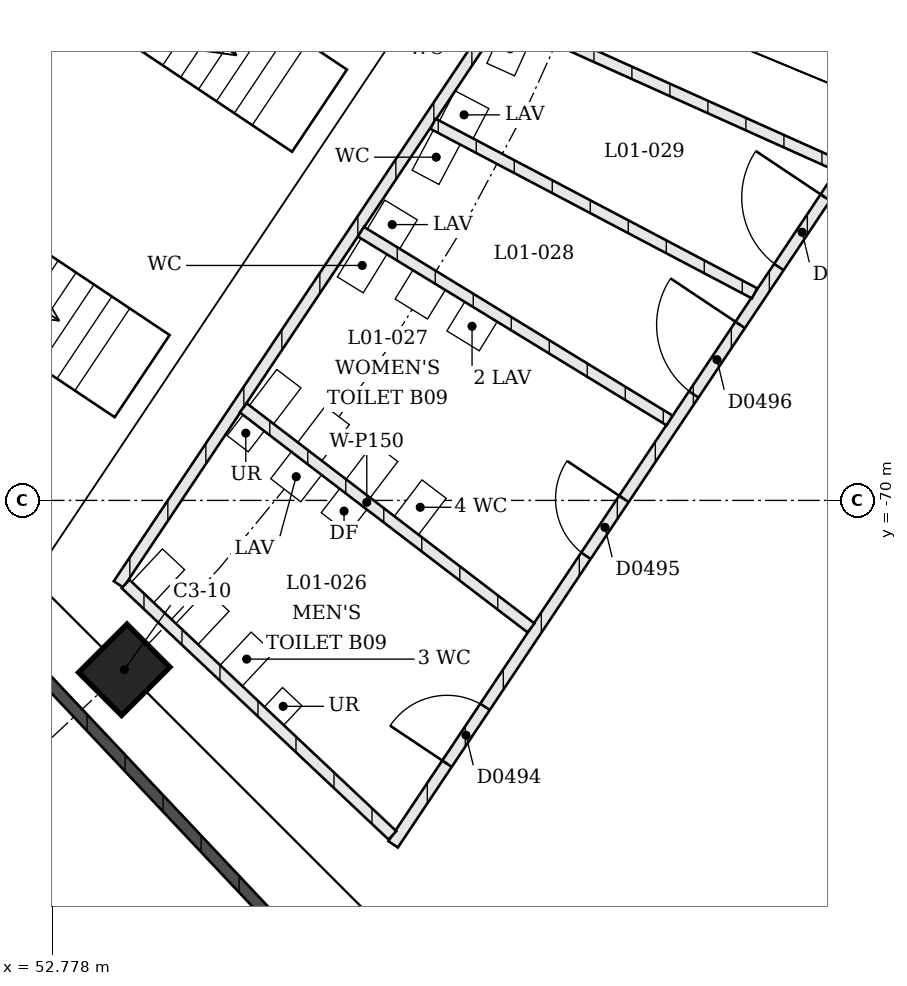
"""IFC4 building model, lengths in metres.
Left out: names, types, materials, properties, quantities, classifications, styles, units other than length and angle.
Written with IfcOpenShell. Run it as: python <this file> out.ifc"""

import sys

from ifc_helpers import new_model, si_unit, direction, frame, frame_2d, origin, origin_2d, place, context, subcontext, project, spatial, rectangle, extrude, element, fill, save


model = new_model("IFC4")
c1 = context("Model", 3, precision=1e-05, world=origin(), true_north=direction((0.0, 1.0)))
c2 = subcontext(c1, "Body", "Model", "MODEL_VIEW")
j1 = project(units=[si_unit("LENGTHUNIT", "METRE"), si_unit("PLANEANGLEUNIT", "RADIAN")], contexts=[c1])
p1 = place(None, origin())
s1 = spatial("IfcSite", under=j1, at=p1, CompositionType="ELEMENT")
p2 = place(p1, origin())
s2 = spatial("IfcBuilding", under=s1, at=p2, CompositionType="ELEMENT")
p3 = place(p2, frame((0.0, 0.0, 4.5)))
s3 = spatial("IfcBuildingStorey", under=s2, at=p3, CompositionType="ELEMENT", Elevation=4.5)
p4 = place(p3, frame((53.728, -72.228, 0.0), z_axis=(0.0, 0.0, 1.0), x_axis=(0.707106781187, 0.707106781187, 0.0)))
e1 = element("IfcColumn", 1, at=p4, inside=s3, PredefinedType="COLUMN", context=c2, shape_type="SweptSolid", body=[
    extrude(rectangle(XDim=0.9, YDim=0.8, at=origin_2d()), origin(), (0.0, 0.0, 1.0), 4.5),
])
p5 = place(p3, frame((59.304, -62.408, 0.0), z_axis=(0.0, 0.0, 1.0), x_axis=(0.931152553876, -0.364629841634, 0.0)))
e2 = element("IfcWall", 2, at=p5, inside=s3, PredefinedType="SOLIDWALL", context=c2, shape_type="SweptSolid", body=[
    extrude(rectangle(XDim=4.832, YDim=0.15, at=frame_2d((2.416, 0.0))), origin(), (0.0, 0.0, 1.0), 3.0),
])
p6 = place(p3, frame((53.653, -71.105, 0.0), z_axis=(0.0, 0.0, 1.0), x_axis=(0.555566497886, 0.831472108027, 0.0)))
e3 = element("IfcWall", 3, at=p6, inside=s3, PredefinedType="PARTITIONING", context=c2, shape_type="SweptSolid", body=[
    extrude(rectangle(XDim=9.102, YDim=0.15, at=frame_2d((4.551, 0.0))), origin(), (0.0, 0.0, 1.0), 3.0),
])
p7 = place(p3, frame((57.266, -74.525, 0.0), z_axis=(0.0, 0.0, 1.0), x_axis=(0.555562662276, 0.831474670862, 0.0)))
e4 = element("IfcWall", 4, at=p7, inside=s3, PredefinedType="PARTITIONING", context=c2, shape_type="SweptSolid", body=[
    extrude(rectangle(XDim=10.775, YDim=0.15, at=frame_2d((5.387, 0.0))), origin(), (0.0, 0.0, 1.0), 3.0),
])
p8 = place(p7, frame((1.276, 0.0, 0.0)))
e5 = element("IfcOpeningElement", 5, at=p8, cuts=e4, PredefinedType="OPENING", context=c2, shape_type="SweptSolid", body=[
    extrude(rectangle(XDim=0.9, YDim=2.1, at=frame_2d((0.45, 1.05))), frame((0.0, 0.075, 0.0), z_axis=(0.0, -1.0, 0.0), x_axis=(1.0, 0.0, 0.0)), (0.0, 0.0, 1.0), 0.15),
])
p9 = place(p7, frame((4.566, 0.0, 0.0)))
e6 = element("IfcOpeningElement", 6, at=p9, cuts=e4, PredefinedType="OPENING", context=c2, shape_type="SweptSolid", body=[
    extrude(rectangle(XDim=0.9, YDim=2.1, at=frame_2d((0.45, 1.05))), frame((0.0, 0.075, 0.0), z_axis=(0.0, -1.0, 0.0), x_axis=(1.0, 0.0, 0.0)), (0.0, 0.0, 1.0), 0.15),
])
p10 = place(p7, frame((7.119, 0.0, 0.0)))
e7 = element("IfcOpeningElement", 7, at=p10, cuts=e4, PredefinedType="OPENING", context=c2, shape_type="SweptSolid", body=[
    extrude(rectangle(XDim=1.1, YDim=2.1, at=frame_2d((0.55, 1.05))), frame((0.0, 0.075, 0.0), z_axis=(0.0, -1.0, 0.0), x_axis=(1.0, 0.0, 0.0)), (0.0, 0.0, 1.0), 0.15),
])
p11 = place(p7, frame((9.135, 0.0, 0.0)))
e8 = element("IfcOpeningElement", 8, at=p11, cuts=e4, PredefinedType="OPENING", context=c2, shape_type="SweptSolid", body=[
    extrude(rectangle(XDim=1.1, YDim=2.1, at=frame_2d((0.55, 1.05))), frame((0.0, 0.075, 0.0), z_axis=(0.0, -1.0, 0.0), x_axis=(1.0, 0.0, 0.0)), (0.0, 0.0, 1.0), 0.15),
])
p12 = place(p3, frame((53.746, -71.099, 0.0), z_axis=(0.0, 0.0, 1.0), x_axis=(0.727898273696, -0.685685134118, 0.0)))
e9 = element("IfcWall", 9, at=p12, inside=s3, PredefinedType="PARTITIONING", context=c2, shape_type="SweptSolid", body=[
    extrude(rectangle(XDim=4.823, YDim=0.15, at=frame_2d((2.412, 0.0))), origin(), (0.0, 0.0, 1.0), 3.0),
])
p13 = place(p3, frame((55.294, -68.782, 0.0), z_axis=(0.0, 0.0, 1.0), x_axis=(0.794378186515, -0.607423490482, 0.0)))
e10 = element("IfcWall", 10, at=p13, inside=s3, PredefinedType="PARTITIONING", context=c2, shape_type="SweptSolid", body=[
    extrude(rectangle(XDim=4.766, YDim=0.15, at=frame_2d((2.383, 0.0))), origin(), (0.0, 0.0, 1.0), 3.0),
])
p14 = place(p3, frame((56.842, -66.465, 0.0), z_axis=(0.0, 0.0, 1.0), x_axis=(0.853168994556, -0.521634610364, 0.0)))
e11 = element("IfcWall", 11, at=p14, inside=s3, PredefinedType="PARTITIONING", context=c2, shape_type="SweptSolid", body=[
    extrude(rectangle(XDim=4.761, YDim=0.15, at=frame_2d((2.38, 0.0))), origin(), (0.0, 0.0, 1.0), 3.0),
])
p15 = place(p3, frame((57.791, -65.045, 0.0), z_axis=(0.0, 0.0, 1.0), x_axis=(0.884560293024, -0.466425865498, 0.0)))
e12 = element("IfcWall", 12, at=p15, inside=s3, PredefinedType="PARTITIONING", context=c2, shape_type="SweptSolid", body=[
    extrude(rectangle(XDim=4.782, YDim=0.15, at=frame_2d((2.391, 0.0))), origin(), (0.0, 0.0, 1.0), 3.0),
])
p16 = place(p3, frame((58.74, -63.625, 0.0), z_axis=(0.0, 0.0, 1.0), x_axis=(0.912037017215, -0.410107887306, 0.0)))
e13 = element("IfcWall", 13, at=p16, inside=s3, PredefinedType="PARTITIONING", context=c2, shape_type="SweptSolid", body=[
    extrude(rectangle(XDim=4.823, YDim=0.15, at=frame_2d((2.412, 0.0))), origin(), (0.0, 0.0, 1.0), 3.0),
])
p17 = place(p3, frame((52.599, -72.246, 0.0), z_axis=(0.0, 0.0, 1.0), x_axis=(0.685685134118, -0.727898273696, 0.0)))
e14 = element("IfcWall", 14, at=p17, inside=s3, PredefinedType="SOLIDWALL", context=c2, shape_type="SweptSolid", body=[
    extrude(rectangle(XDim=4.823, YDim=0.15, at=frame_2d((2.412, 0.0))), origin(), (0.0, 0.0, 1.0), 3.0),
])
p18 = place(p8, origin())
e15 = element("IfcDoor", 15, at=p18, inside=s3, OperationType="SINGLE_SWING_RIGHT", PredefinedType="DOOR", context=c2, shape_type="SweptSolid", body=[
    extrude(rectangle(XDim=0.9, YDim=2.1, at=frame_2d((0.45, 1.05))), frame((0.0, 0.025, 0.0), z_axis=(0.0, -1.0, 0.0), x_axis=(1.0, 0.0, 0.0)), (0.0, 0.0, 1.0), 0.05),
])
fill(e5, e15)
p19 = place(p9, origin())
e16 = element("IfcDoor", 16, at=p19, inside=s3, OperationType="SINGLE_SWING_LEFT", PredefinedType="DOOR", context=c2, shape_type="SweptSolid", body=[
    extrude(rectangle(XDim=0.9, YDim=2.1, at=frame_2d((0.45, 1.05))), frame((0.0, 0.025, 0.0), z_axis=(0.0, -1.0, 0.0), x_axis=(1.0, 0.0, 0.0)), (0.0, 0.0, 1.0), 0.05),
])
fill(e6, e16)
p20 = place(p10, origin())
e17 = element("IfcDoor", 17, at=p20, inside=s3, OperationType="SINGLE_SWING_LEFT", PredefinedType="DOOR", context=c2, shape_type="SweptSolid", body=[
    extrude(rectangle(XDim=1.1, YDim=2.1, at=frame_2d((0.55, 1.05))), frame((0.0, 0.025, 0.0), z_axis=(0.0, -1.0, 0.0), x_axis=(1.0, 0.0, 0.0)), (0.0, 0.0, 1.0), 0.05),
])
fill(e7, e17)
p21 = place(p11, origin())
e18 = element("IfcDoor", 18, at=p21, inside=s3, OperationType="SINGLE_SWING_LEFT", PredefinedType="DOOR", context=c2, shape_type="SweptSolid", body=[
    extrude(rectangle(XDim=1.1, YDim=2.1, at=frame_2d((0.55, 1.05))), frame((0.0, 0.025, 0.0), z_axis=(0.0, -1.0, 0.0), x_axis=(1.0, 0.0, 0.0)), (0.0, 0.0, 1.0), 0.05),
])
fill(e8, e18)
save(model, sys.argv[1])
